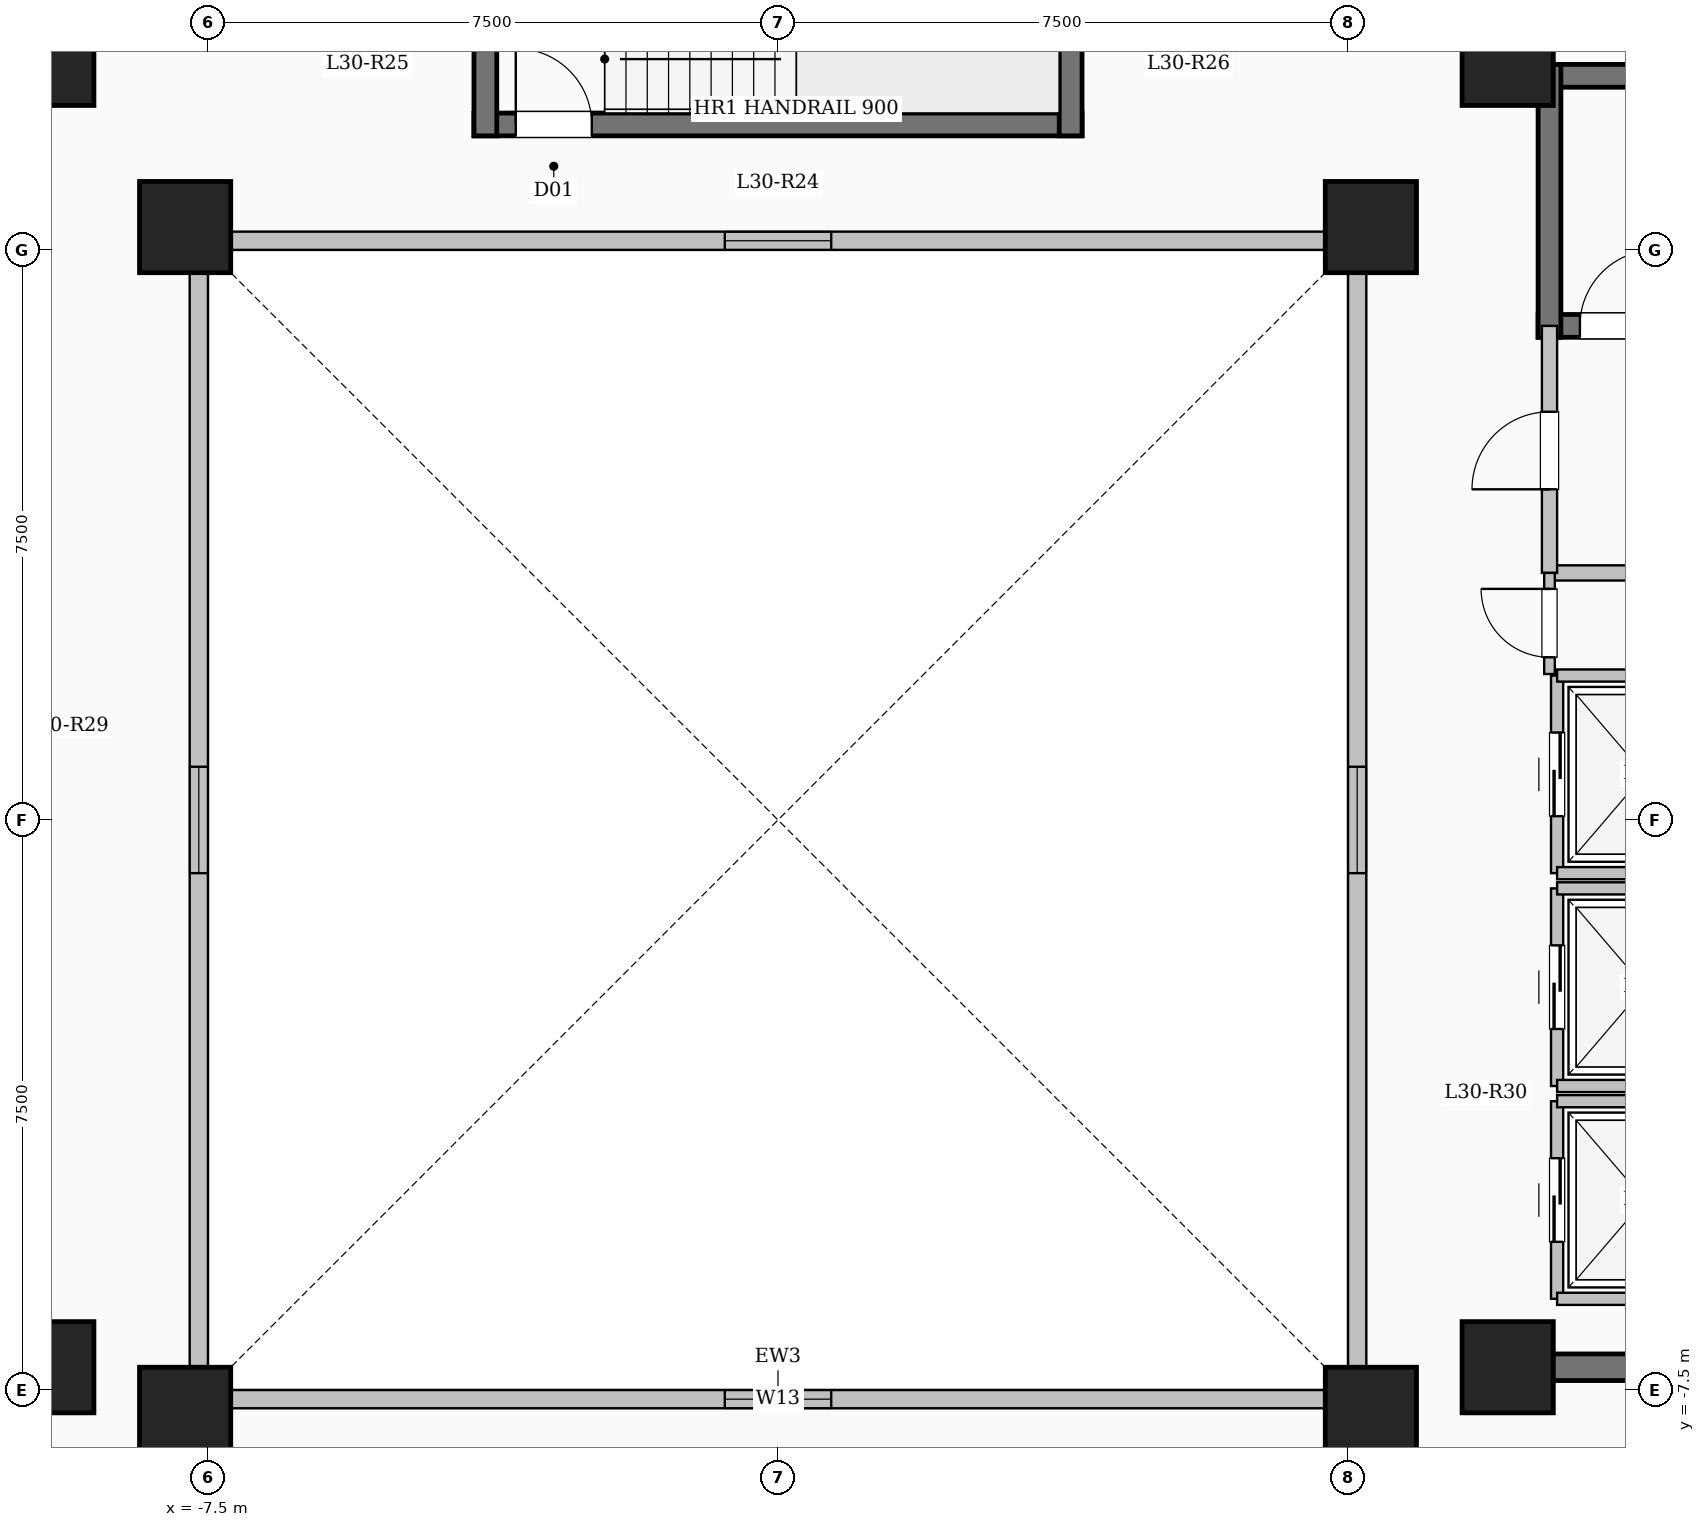
"""IFC4 building model, lengths in metres.
Left out: names, types, materials, properties, quantities, classifications, styles, units other than length and angle.
Written with IfcOpenShell. Run it as: python <this file> out.ifc"""

import sys

from ifc_helpers import new_model, si_unit, direction, frame, frame_2d, origin, origin_2d, place, context, subcontext, project, spatial, rectangle, extrude, element, fill, save


model = new_model("IFC4")
c1 = context("Model", 3, precision=1e-05, world=origin(), true_north=direction((0.0, 1.0)))
c2 = subcontext(c1, "Body", "Model", "MODEL_VIEW")
j1 = project(units=[si_unit("LENGTHUNIT", "METRE"), si_unit("PLANEANGLEUNIT", "RADIAN")], contexts=[c1])
p1 = place(None, origin())
s1 = spatial("IfcSite", under=j1, at=p1, CompositionType="ELEMENT")
p2 = place(p1, origin())
s2 = spatial("IfcBuilding", under=s1, at=p2, CompositionType="ELEMENT")
p3 = place(p2, frame((0.0, 0.0, 111.8)))
s3 = spatial("IfcBuildingStorey", under=s2, at=p3, CompositionType="ELEMENT", Elevation=111.8)
for number, where, z_axis, x_axis in (
    (1, (-7.8, -7.8, 0.0), (0.0, 0.0, 1.0), (1.0, 0.0, 0.0)),
    (2, (7.8, -7.8, 0.0), (0.0, 0.0, 1.0), (1.0, 0.0, 0.0)),
    (3, (-7.8, 7.8, 0.0), (0.0, 0.0, 1.0), (1.0, 0.0, 0.0)),
    (4, (7.8, 7.8, 0.0), (0.0, 0.0, 1.0), (1.0, 0.0, 0.0)),
    (5, (-9.6, -7.2, 0.0), (0.0, 0.0, 1.0), (1.0, 0.0, 0.0)),
    (6, (-9.6, 10.0, 0.0), (0.0, 0.0, 1.0), (1.0, 0.0, 0.0)),
    (7, (9.6, -7.2, 0.0), (0.0, 0.0, 1.0), (1.0, 0.0, 0.0)),
    (8, (9.6, 10.0, 0.0), (0.0, 0.0, 1.0), (1.0, 0.0, 0.0)),
):
    element("IfcColumn", number, at=place(p3, frame(where, z_axis=z_axis, x_axis=x_axis)), inside=s3, PredefinedType="COLUMN", context=c2, shape_type="SweptSolid", body=[
        extrude(rectangle(XDim=1.2, YDim=1.2, at=origin_2d()), origin(), (0.0, 0.0, 1.0), 3.35),
    ])
p4 = place(p3, frame((-7.62, -7.62, 0.0), z_axis=(0.0, 0.0, 1.0), x_axis=(1.0, 0.0, 0.0)))
e9 = element("IfcWall", 9, at=p4, inside=s3, PredefinedType="SOLIDWALL", context=c2, shape_type="SweptSolid", body=[
    extrude(rectangle(XDim=15.24, YDim=0.24, at=frame_2d((7.62, 0.0))), origin(), (0.0, 0.0, 1.0), 3.1),
])
p5 = place(p4, frame((6.92, 0.0, 0.95)))
e10 = element("IfcOpeningElement", 10, at=p5, cuts=e9, PredefinedType="OPENING", context=c2, shape_type="SweptSolid", body=[
    extrude(rectangle(XDim=1.4, YDim=1.5, at=frame_2d((0.7, 0.75))), frame((0.0, 0.13, 0.0), z_axis=(0.0, -1.0, 0.0), x_axis=(1.0, 0.0, 0.0)), (0.0, 0.0, 1.0), 0.26),
])
p6 = place(p3, frame((7.62, -7.62, 0.0), z_axis=(0.0, 0.0, 1.0), x_axis=(0.0, 1.0, 0.0)))
e11 = element("IfcWall", 11, at=p6, inside=s3, PredefinedType="SOLIDWALL", context=c2, shape_type="SweptSolid", body=[
    extrude(rectangle(XDim=15.24, YDim=0.24, at=frame_2d((7.62, 0.0))), origin(), (0.0, 0.0, 1.0), 3.1),
])
p7 = place(p6, frame((6.92, 0.0, 0.95)))
e12 = element("IfcOpeningElement", 12, at=p7, cuts=e11, PredefinedType="OPENING", context=c2, shape_type="SweptSolid", body=[
    extrude(rectangle(XDim=1.4, YDim=1.5, at=frame_2d((0.7, 0.75))), frame((0.0, 0.13, 0.0), z_axis=(0.0, -1.0, 0.0), x_axis=(1.0, 0.0, 0.0)), (0.0, 0.0, 1.0), 0.26),
])
p8 = place(p3, frame((7.62, 7.62, 0.0), z_axis=(0.0, 0.0, 1.0), x_axis=(-1.0, 0.0, 0.0)))
e13 = element("IfcWall", 13, at=p8, inside=s3, PredefinedType="SOLIDWALL", context=c2, shape_type="SweptSolid", body=[
    extrude(rectangle(XDim=15.24, YDim=0.24, at=frame_2d((7.62, 0.0))), origin(), (0.0, 0.0, 1.0), 3.1),
])
p9 = place(p8, frame((6.92, 0.0, 0.95)))
e14 = element("IfcOpeningElement", 14, at=p9, cuts=e13, PredefinedType="OPENING", context=c2, shape_type="SweptSolid", body=[
    extrude(rectangle(XDim=1.4, YDim=1.5, at=frame_2d((0.7, 0.75))), frame((0.0, 0.13, 0.0), z_axis=(0.0, -1.0, 0.0), x_axis=(1.0, 0.0, 0.0)), (0.0, 0.0, 1.0), 0.26),
])
p10 = place(p3, frame((-7.62, 7.62, 0.0), z_axis=(0.0, 0.0, 1.0), x_axis=(0.0, -1.0, 0.0)))
e15 = element("IfcWall", 15, at=p10, inside=s3, PredefinedType="SOLIDWALL", context=c2, shape_type="SweptSolid", body=[
    extrude(rectangle(XDim=15.24, YDim=0.24, at=frame_2d((7.62, 0.0))), origin(), (0.0, 0.0, 1.0), 3.1),
])
p11 = place(p10, frame((6.92, 0.0, 0.95)))
e16 = element("IfcOpeningElement", 16, at=p11, cuts=e15, PredefinedType="OPENING", context=c2, shape_type="SweptSolid", body=[
    extrude(rectangle(XDim=1.4, YDim=1.5, at=frame_2d((0.7, 0.75))), frame((0.0, 0.13, 0.0), z_axis=(0.0, -1.0, 0.0), x_axis=(1.0, 0.0, 0.0)), (0.0, 0.0, 1.0), 0.26),
])
p12 = place(p3, frame((10.0, 9.79, 0.0), z_axis=(0.0, 0.0, 1.0), x_axis=(1.0, 0.0, 0.0)))
e17 = element("IfcWall", 17, at=p12, inside=s3, PredefinedType="SHEAR", context=c2, shape_type="SweptSolid", body=[
    extrude(rectangle(XDim=8.0, YDim=0.3, at=frame_2d((4.0, 0.0))), origin(), (0.0, 0.0, 1.0), 3.35),
])
p13 = place(p3, frame((10.0, 6.5, 0.0), z_axis=(0.0, 0.0, 1.0), x_axis=(1.0, 0.0, 0.0)))
e18 = element("IfcWall", 18, at=p13, inside=s3, PredefinedType="SHEAR", context=c2, shape_type="SweptSolid", body=[
    extrude(rectangle(XDim=8.0, YDim=0.3, at=frame_2d((4.0, 0.0))), origin(), (0.0, 0.0, 1.0), 3.35),
])
p14 = place(p13, frame((0.55, 0.0, 0.0)))
e19 = element("IfcOpeningElement", 19, at=p14, cuts=e18, PredefinedType="OPENING", context=c2, shape_type="SweptSolid", body=[
    extrude(rectangle(XDim=1.0, YDim=2.15, at=frame_2d((0.5, 1.075))), frame((0.0, 0.16, 0.0), z_axis=(0.0, -1.0, 0.0), x_axis=(1.0, 0.0, 0.0)), (0.0, 0.0, 1.0), 0.32),
])
p15 = place(p3, frame((10.15, 6.35, 0.0), z_axis=(0.0, 0.0, 1.0), x_axis=(0.0, 1.0, 0.0)))
e20 = element("IfcWall", 20, at=p15, inside=s3, PredefinedType="SHEAR", context=c2, shape_type="SweptSolid", body=[
    extrude(rectangle(XDim=3.59, YDim=0.3, at=frame_2d((1.795, 0.0))), origin(), (0.0, 0.0, 1.0), 3.35),
])
p16 = place(p3, frame((-4.0, 9.15, 0.0), z_axis=(0.0, 0.0, 1.0), x_axis=(1.0, 0.0, 0.0)))
e21 = element("IfcWall", 21, at=p16, inside=s3, PredefinedType="SHEAR", context=c2, shape_type="SweptSolid", body=[
    extrude(rectangle(XDim=8.0, YDim=0.3, at=frame_2d((4.0, 0.0))), origin(), (0.0, 0.0, 1.0), 3.35),
])
p17 = place(p16, frame((0.55, 0.0, 0.0)))
e22 = element("IfcOpeningElement", 22, at=p17, cuts=e21, PredefinedType="OPENING", context=c2, shape_type="SweptSolid", body=[
    extrude(rectangle(XDim=1.0, YDim=2.15, at=frame_2d((0.5, 1.075))), frame((0.0, 0.16, 0.0), z_axis=(0.0, -1.0, 0.0), x_axis=(1.0, 0.0, 0.0)), (0.0, 0.0, 1.0), 0.32),
])
for number, where, z_axis, x_axis in (
    (23, (-3.85, 9.0, 0.0), (0.0, 0.0, 1.0), (0.0, 1.0, 0.0)),
    (24, (3.85, 9.0, 0.0), (0.0, 0.0, 1.0), (0.0, 1.0, 0.0)),
):
    element("IfcWall", number, at=place(p3, frame(where, z_axis=z_axis, x_axis=x_axis)), inside=s3, PredefinedType="SHEAR", context=c2, shape_type="SweptSolid", body=[
        extrude(rectangle(XDim=3.59, YDim=0.3, at=frame_2d((1.795, 0.0))), origin(), (0.0, 0.0, 1.0), 3.35),
    ])
p18 = place(p3, frame((10.15, 3.25, 0.0), z_axis=(0.0, 0.0, 1.0), x_axis=(1.0, 0.0, 0.0)))
e25 = element("IfcWall", 25, at=p18, inside=s3, PredefinedType="SOLIDWALL", context=c2, shape_type="SweptSolid", body=[
    extrude(rectangle(XDim=5.4, YDim=0.2, at=frame_2d((2.7, 0.0))), origin(), (0.0, 0.0, 1.0), 3.1),
])
p19 = place(p3, frame((10.15, 3.25, 0.0), z_axis=(0.0, 0.0, 1.0), x_axis=(0.0, 1.0, 0.0)))
e26 = element("IfcWall", 26, at=p19, inside=s3, PredefinedType="SOLIDWALL", context=c2, shape_type="SweptSolid", body=[
    extrude(rectangle(XDim=3.25, YDim=0.2, at=frame_2d((1.625, 0.0))), origin(), (0.0, 0.0, 1.0), 3.1),
])
p20 = place(p19, frame((1.1, 0.0, 0.0)))
e27 = element("IfcOpeningElement", 27, at=p20, cuts=e26, PredefinedType="OPENING", context=c2, shape_type="SweptSolid", body=[
    extrude(rectangle(XDim=1.02, YDim=2.15, at=frame_2d((0.51, 1.075))), frame((0.0, 0.11, 0.0), z_axis=(0.0, -1.0, 0.0), x_axis=(1.0, 0.0, 0.0)), (0.0, 0.0, 1.0), 0.22),
])
p21 = place(p3, frame((10.25, -6.3, 0.0), z_axis=(0.0, 0.0, 1.0), x_axis=(0.0, 1.0, 0.0)))
e28 = element("IfcWall", 28, at=p21, inside=s3, PredefinedType="SOLIDWALL", context=c2, shape_type="SweptSolid", body=[
    extrude(rectangle(XDim=2.6, YDim=0.16, at=frame_2d((1.3, 0.0))), origin(), (0.0, 0.0, 1.0), 3.1),
])
p22 = place(p21, frame((0.75, 0.0, 0.0)))
e29 = element("IfcOpeningElement", 29, at=p22, cuts=e28, PredefinedType="OPENING", context=c2, shape_type="SweptSolid", body=[
    extrude(rectangle(XDim=1.1, YDim=2.15, at=frame_2d((0.55, 1.075))), frame((0.0, 0.09, 0.0), z_axis=(0.0, -1.0, 0.0), x_axis=(1.0, 0.0, 0.0)), (0.0, 0.0, 1.0), 0.18),
])
for number, where, z_axis, x_axis in (
    (30, (10.25, -6.3, 0.0), (0.0, 0.0, 1.0), (1.0, 0.0, 0.0)),
    (31, (10.25, -3.7, 0.0), (0.0, 0.0, 1.0), (1.0, 0.0, 0.0)),
):
    element("IfcWall", number, at=place(p3, frame(where, z_axis=z_axis, x_axis=x_axis)), inside=s3, PredefinedType="SOLIDWALL", context=c2, shape_type="SweptSolid", body=[
        extrude(rectangle(XDim=2.3, YDim=0.16, at=frame_2d((1.15, 0.0))), origin(), (0.0, 0.0, 1.0), 3.1),
    ])
p23 = place(p3, frame((10.25, -3.5, 0.0), z_axis=(0.0, 0.0, 1.0), x_axis=(0.0, 1.0, 0.0)))
e32 = element("IfcWall", 32, at=p23, inside=s3, PredefinedType="SOLIDWALL", context=c2, shape_type="SweptSolid", body=[
    extrude(rectangle(XDim=2.6, YDim=0.16, at=frame_2d((1.3, 0.0))), origin(), (0.0, 0.0, 1.0), 3.1),
])
p24 = place(p23, frame((0.75, 0.0, 0.0)))
e33 = element("IfcOpeningElement", 33, at=p24, cuts=e32, PredefinedType="OPENING", context=c2, shape_type="SweptSolid", body=[
    extrude(rectangle(XDim=1.1, YDim=2.15, at=frame_2d((0.55, 1.075))), frame((0.0, 0.09, 0.0), z_axis=(0.0, -1.0, 0.0), x_axis=(1.0, 0.0, 0.0)), (0.0, 0.0, 1.0), 0.18),
])
for number, where, z_axis, x_axis in (
    (34, (10.25, -3.5, 0.0), (0.0, 0.0, 1.0), (1.0, 0.0, 0.0)),
    (35, (10.25, -0.9, 0.0), (0.0, 0.0, 1.0), (1.0, 0.0, 0.0)),
):
    element("IfcWall", number, at=place(p3, frame(where, z_axis=z_axis, x_axis=x_axis)), inside=s3, PredefinedType="SOLIDWALL", context=c2, shape_type="SweptSolid", body=[
        extrude(rectangle(XDim=2.3, YDim=0.16, at=frame_2d((1.15, 0.0))), origin(), (0.0, 0.0, 1.0), 3.1),
    ])
p25 = place(p3, frame((10.25, -0.7, 0.0), z_axis=(0.0, 0.0, 1.0), x_axis=(0.0, 1.0, 0.0)))
e36 = element("IfcWall", 36, at=p25, inside=s3, PredefinedType="SOLIDWALL", context=c2, shape_type="SweptSolid", body=[
    extrude(rectangle(XDim=2.6, YDim=0.16, at=frame_2d((1.3, 0.0))), origin(), (0.0, 0.0, 1.0), 3.1),
])
p26 = place(p25, frame((0.75, 0.0, 0.0)))
e37 = element("IfcOpeningElement", 37, at=p26, cuts=e36, PredefinedType="OPENING", context=c2, shape_type="SweptSolid", body=[
    extrude(rectangle(XDim=1.1, YDim=2.15, at=frame_2d((0.55, 1.075))), frame((0.0, 0.09, 0.0), z_axis=(0.0, -1.0, 0.0), x_axis=(1.0, 0.0, 0.0)), (0.0, 0.0, 1.0), 0.18),
])
for number, where, z_axis, x_axis in (
    (38, (10.25, -0.7, 0.0), (0.0, 0.0, 1.0), (1.0, 0.0, 0.0)),
    (39, (10.25, 1.9, 0.0), (0.0, 0.0, 1.0), (1.0, 0.0, 0.0)),
):
    element("IfcWall", number, at=place(p3, frame(where, z_axis=z_axis, x_axis=x_axis)), inside=s3, PredefinedType="SOLIDWALL", context=c2, shape_type="SweptSolid", body=[
        extrude(rectangle(XDim=2.3, YDim=0.16, at=frame_2d((1.15, 0.0))), origin(), (0.0, 0.0, 1.0), 3.1),
    ])
p27 = place(p3, frame((10.075, -7.2, 0.0), z_axis=(0.0, 0.0, 1.0), x_axis=(1.0, 0.0, 0.0)))
e40 = element("IfcWall", 40, at=p27, inside=s3, PredefinedType="SHEAR", context=c2, shape_type="SweptSolid", body=[
    extrude(rectangle(XDim=8.55, YDim=0.35, at=frame_2d((4.275, 0.0))), origin(), (0.0, 0.0, 1.0), 3.35),
])
p28 = place(p3, frame((10.15, 1.92, 0.0), z_axis=(0.0, 0.0, 1.0), x_axis=(0.0, 1.0, 0.0)))
e41 = element("IfcWall", 41, at=p28, inside=s3, PredefinedType="PARTITIONING", context=c2, shape_type="SweptSolid", body=[
    extrude(rectangle(XDim=1.33, YDim=0.14, at=frame_2d((0.665, 0.0))), origin(), (0.0, 0.0, 1.0), 3.1),
])
p29 = place(p28, frame((0.22, 0.0, 0.0)))
e42 = element("IfcOpeningElement", 42, at=p29, cuts=e41, PredefinedType="OPENING", context=c2, shape_type="SweptSolid", body=[
    extrude(rectangle(XDim=0.9, YDim=2.08, at=frame_2d((0.45, 1.04))), frame((0.0, 0.08, 0.0), z_axis=(0.0, -1.0, 0.0), x_axis=(1.0, 0.0, 0.0)), (0.0, 0.0, 1.0), 0.16),
])
p30 = place(p5, origin())
e43 = element("IfcWindow", 43, at=p30, inside=s3, PartitioningType="SINGLE_PANEL", PredefinedType="WINDOW", context=c2, shape_type="SweptSolid", body=[
    extrude(rectangle(XDim=1.4, YDim=1.5, at=frame_2d((0.7, 0.75))), frame((0.0, 0.03, 0.0), z_axis=(0.0, -1.0, 0.0), x_axis=(1.0, 0.0, 0.0)), (0.0, 0.0, 1.0), 0.06),
])
fill(e10, e43)
p31 = place(p7, origin())
e44 = element("IfcWindow", 44, at=p31, inside=s3, PartitioningType="SINGLE_PANEL", PredefinedType="WINDOW", context=c2, shape_type="SweptSolid", body=[
    extrude(rectangle(XDim=1.4, YDim=1.5, at=frame_2d((0.7, 0.75))), frame((0.0, 0.03, 0.0), z_axis=(0.0, -1.0, 0.0), x_axis=(1.0, 0.0, 0.0)), (0.0, 0.0, 1.0), 0.06),
])
fill(e12, e44)
p32 = place(p9, origin())
e45 = element("IfcWindow", 45, at=p32, inside=s3, PartitioningType="SINGLE_PANEL", PredefinedType="WINDOW", context=c2, shape_type="SweptSolid", body=[
    extrude(rectangle(XDim=1.4, YDim=1.5, at=frame_2d((0.7, 0.75))), frame((0.0, 0.03, 0.0), z_axis=(0.0, -1.0, 0.0), x_axis=(1.0, 0.0, 0.0)), (0.0, 0.0, 1.0), 0.06),
])
fill(e14, e45)
p33 = place(p11, origin())
e46 = element("IfcWindow", 46, at=p33, inside=s3, PartitioningType="SINGLE_PANEL", PredefinedType="WINDOW", context=c2, shape_type="SweptSolid", body=[
    extrude(rectangle(XDim=1.4, YDim=1.5, at=frame_2d((0.7, 0.75))), frame((0.0, 0.03, 0.0), z_axis=(0.0, -1.0, 0.0), x_axis=(1.0, 0.0, 0.0)), (0.0, 0.0, 1.0), 0.06),
])
fill(e16, e46)
p34 = place(p14, origin())
e47 = element("IfcDoor", 47, at=p34, inside=s3, OperationType="SINGLE_SWING_RIGHT", PredefinedType="DOOR", context=c2, shape_type="SweptSolid", body=[
    extrude(rectangle(XDim=1.0, YDim=2.15, at=frame_2d((0.5, 1.075))), frame((0.0, 0.025, 0.0), z_axis=(0.0, -1.0, 0.0), x_axis=(1.0, 0.0, 0.0)), (0.0, 0.0, 1.0), 0.05),
])
fill(e19, e47)
p35 = place(p17, origin())
e48 = element("IfcDoor", 48, at=p35, inside=s3, OperationType="SINGLE_SWING_LEFT", PredefinedType="DOOR", context=c2, shape_type="SweptSolid", body=[
    extrude(rectangle(XDim=1.0, YDim=2.15, at=frame_2d((0.5, 1.075))), frame((0.0, 0.025, 0.0), z_axis=(0.0, -1.0, 0.0), x_axis=(1.0, 0.0, 0.0)), (0.0, 0.0, 1.0), 0.05),
])
fill(e22, e48)
p36 = place(p20, origin())
e49 = element("IfcDoor", 49, at=p36, inside=s3, OperationType="SINGLE_SWING_LEFT", PredefinedType="DOOR", context=c2, shape_type="SweptSolid", body=[
    extrude(rectangle(XDim=1.02, YDim=2.15, at=frame_2d((0.51, 1.075))), frame((0.0, 0.025, 0.0), z_axis=(0.0, -1.0, 0.0), x_axis=(1.0, 0.0, 0.0)), (0.0, 0.0, 1.0), 0.05),
])
fill(e27, e49)
p37 = place(p22, origin())
e50 = element("IfcDoor", 50, at=p37, inside=s3, OperationType="SLIDING_TO_LEFT", PredefinedType="DOOR", context=c2, shape_type="SweptSolid", body=[
    extrude(rectangle(XDim=1.1, YDim=2.15, at=frame_2d((0.55, 1.075))), frame((0.0, 0.025, 0.0), z_axis=(0.0, -1.0, 0.0), x_axis=(1.0, 0.0, 0.0)), (0.0, 0.0, 1.0), 0.05),
])
fill(e29, e50)
p38 = place(p24, origin())
e51 = element("IfcDoor", 51, at=p38, inside=s3, OperationType="SLIDING_TO_LEFT", PredefinedType="DOOR", context=c2, shape_type="SweptSolid", body=[
    extrude(rectangle(XDim=1.1, YDim=2.15, at=frame_2d((0.55, 1.075))), frame((0.0, 0.025, 0.0), z_axis=(0.0, -1.0, 0.0), x_axis=(1.0, 0.0, 0.0)), (0.0, 0.0, 1.0), 0.05),
])
fill(e33, e51)
p39 = place(p26, origin())
e52 = element("IfcDoor", 52, at=p39, inside=s3, OperationType="SLIDING_TO_LEFT", PredefinedType="DOOR", context=c2, shape_type="SweptSolid", body=[
    extrude(rectangle(XDim=1.1, YDim=2.15, at=frame_2d((0.55, 1.075))), frame((0.0, 0.025, 0.0), z_axis=(0.0, -1.0, 0.0), x_axis=(1.0, 0.0, 0.0)), (0.0, 0.0, 1.0), 0.05),
])
fill(e37, e52)
p40 = place(p29, origin())
e53 = element("IfcDoor", 53, at=p40, inside=s3, OperationType="SINGLE_SWING_RIGHT", PredefinedType="DOOR", context=c2, shape_type="SweptSolid", body=[
    extrude(rectangle(XDim=0.9, YDim=2.08, at=frame_2d((0.45, 1.04))), frame((0.0, 0.025, 0.0), z_axis=(0.0, -1.0, 0.0), x_axis=(1.0, 0.0, 0.0)), (0.0, 0.0, 1.0), 0.05),
])
fill(e42, e53)
save(model, sys.argv[1])
